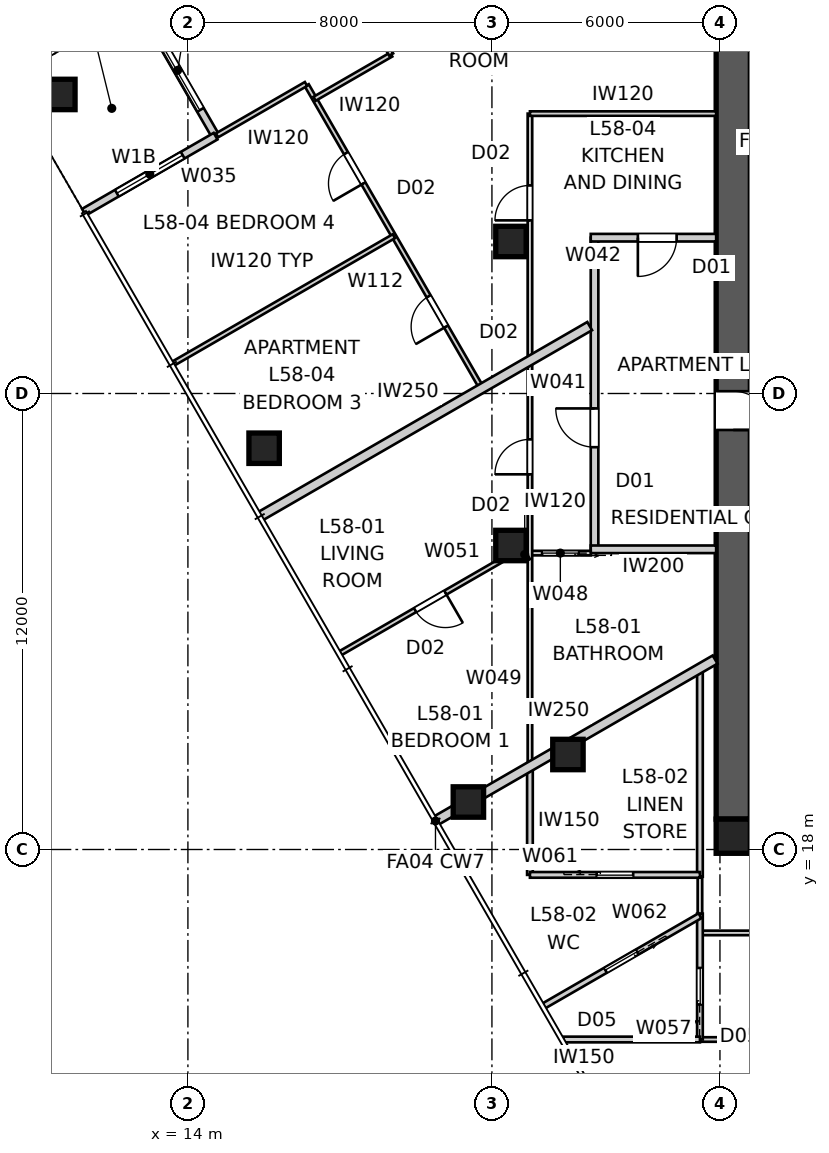
"""IFC4 building model, lengths in metres.
Left out: names, types, materials, properties, quantities, classifications, styles, units other than length and angle.
Written with IfcOpenShell. Run it as: python <this file> out.ifc"""

import sys

from ifc_helpers import new_model, si_unit, direction, frame, frame_2d, origin, origin_2d, place, context, subcontext, project, spatial, polyline, rectangle, outline, extrude, element, fill, save


model = new_model("IFC4")
c1 = context("Model", 3, precision=1e-05, world=origin(), true_north=direction((0.0, 1.0)))
c2 = subcontext(c1, "Body", "Model", "MODEL_VIEW")
j1 = project(units=[si_unit("LENGTHUNIT", "METRE"), si_unit("PLANEANGLEUNIT", "RADIAN")], contexts=[c1])
p1 = place(None, origin())
s1 = spatial("IfcSite", under=j1, at=p1, CompositionType="ELEMENT")
p2 = place(p1, origin())
s2 = spatial("IfcBuilding", under=s1, at=p2, CompositionType="ELEMENT")
p3 = place(p2, frame((0.0, 0.0, 211.6)))
s3 = spatial("IfcBuildingStorey", under=s2, at=p3, CompositionType="ELEMENT", Elevation=211.6)
p4 = place(p3, frame((51.2, 18.35, 0.0), z_axis=(0.0, 0.0, 1.0), x_axis=(-1.0, 0.0, 0.0)))
e1 = element("IfcWall", 1, at=p4, inside=s3, PredefinedType="SHEAR", context=c2, shape_type="SweptSolid", body=[
    extrude(outline(polyline([(0.0, -0.45), (22.4, -0.45), (22.4, -0.025), (22.85, -0.025), (22.85, 0.025), (22.4, 0.025), (22.4, 0.45), (0.0, 0.45), (0.0, 0.025), (-0.45, 0.025), (-0.45, -0.025), (0.0, -0.025), (0.0, -0.45)])), origin(), (0.0, 0.0, 1.0), 3.4),
])
p5 = place(p3, frame((28.35, 41.2, 0.0), z_axis=(0.0, 0.0, 1.0), x_axis=(0.0, -1.0, 0.0)))
e2 = element("IfcWall", 2, at=p5, inside=s3, PredefinedType="SHEAR", context=c2, shape_type="SweptSolid", body=[
    extrude(outline(polyline([(0.0, -0.45), (22.4, -0.45), (22.4, -0.025), (22.85, -0.025), (22.85, 0.025), (22.4, 0.025), (22.4, 0.45), (0.0, 0.45), (0.0, 0.025), (-0.45, 0.025), (-0.45, -0.025), (0.0, -0.025), (0.0, -0.45)])), origin(), (0.0, 0.0, 1.0), 3.4),
])
p6 = place(p5, frame((11.14, 0.0, 0.0)))
e3 = element("IfcOpeningElement", 3, at=p6, cuts=e2, PredefinedType="OPENING", context=c2, shape_type="SweptSolid", body=[
    extrude(rectangle(XDim=1.02, YDim=2.4, at=frame_2d((0.51, 1.2))), frame((0.0, 0.46, 0.0), z_axis=(0.0, -1.0, 0.0), x_axis=(1.0, 0.0, 0.0)), (0.0, 0.0, 1.0), 0.92),
])
p7 = place(p3, frame((28.35, 18.35, 0.0), z_axis=(0.0, 0.0, 1.0), x_axis=(1.0, 0.0, 0.0)))
e4 = element("IfcColumn", 4, at=p7, inside=s3, PredefinedType="COLUMN", context=c2, shape_type="SweptSolid", body=[
    extrude(rectangle(XDim=0.9, YDim=0.9, at=origin_2d()), origin(), (0.0, 0.0, 1.0), 3.4),
])
for number, where, z_axis, x_axis in (
    (5, (10.63, 37.87, 0.0), (0.0, 0.0, 1.0), (1.0, 0.0, 0.0)),
    (6, (16.005, 28.56, 0.0), (0.0, 0.0, 1.0), (1.0, 0.0, 0.0)),
    (7, (21.38, 19.25, 0.0), (0.0, 0.0, 1.0), (1.0, 0.0, 0.0)),
    (8, (22.5, 34.0, 0.0), (0.0, 0.0, 1.0), (1.0, 0.0, 0.0)),
    (9, (22.5, 26.0, 0.0), (0.0, 0.0, 1.0), (1.0, 0.0, 0.0)),
    (10, (24.0, 20.5, 0.0), (0.0, 0.0, 1.0), (1.0, 0.0, 0.0)),
):
    element("IfcColumn", number, at=place(p3, frame(where, z_axis=z_axis, x_axis=x_axis)), inside=s3, PredefinedType="COLUMN", context=c2, shape_type="SweptSolid", body=[
        extrude(rectangle(XDim=0.8, YDim=0.8, at=origin_2d()), origin(), (0.0, 0.0, 1.0), 3.4),
    ])
p8 = place(p3, frame((12.729, 40.236, 0.0), z_axis=(0.0, 0.0, 1.0), x_axis=(0.49999894854, -0.866026010844, 0.0)))
e11 = element("IfcWall", 11, at=p8, inside=s3, PredefinedType="SOLIDWALL", context=c2, shape_type="SweptSolid", body=[
    extrude(rectangle(XDim=4.0, YDim=0.2, at=frame_2d((2.0, 0.0))), origin(), (0.0, 0.0, 1.0), 3.25),
])
p9 = place(p8, frame((0.8, 0.0, 0.0)))
e12 = element("IfcOpeningElement", 12, at=p9, cuts=e11, PredefinedType="OPENING", context=c2, shape_type="SweptSolid", body=[
    extrude(rectangle(XDim=2.4, YDim=2.1, at=frame_2d((1.2, 1.05))), frame((0.0, 0.11, 0.0), z_axis=(0.0, -1.0, 0.0), x_axis=(1.0, 0.0, 0.0)), (0.0, 0.0, 1.0), 0.22),
])
p10 = place(p3, frame((14.729, 36.771, 0.0), z_axis=(0.0, 0.0, 1.0), x_axis=(-0.866026010844, -0.49999894854, 0.0)))
e13 = element("IfcWall", 13, at=p10, inside=s3, PredefinedType="SOLIDWALL", context=c2, shape_type="SweptSolid", body=[
    extrude(rectangle(XDim=4.0, YDim=0.2, at=frame_2d((2.0, 0.0))), origin(), (0.0, 0.0, 1.0), 3.25),
])
p11 = place(p10, frame((1.0, 0.0, 0.45)))
e14 = element("IfcOpeningElement", 14, at=p11, cuts=e13, PredefinedType="OPENING", context=c2, shape_type="SweptSolid", body=[
    extrude(rectangle(XDim=2.0, YDim=1.8, at=frame_2d((1.0, 0.9))), frame((0.0, 0.11, 0.0), z_axis=(0.0, -1.0, 0.0), x_axis=(1.0, 0.0, 0.0)), (0.0, 0.0, 1.0), 0.22),
])
p12 = place(p3, frame((24.7, 25.9, 0.0), z_axis=(0.0, 0.0, 1.0), x_axis=(0.0, 1.0, 0.0)))
e15 = element("IfcWall", 15, at=p12, inside=s3, PredefinedType="PARTITIONING", context=c2, shape_type="SweptSolid", body=[
    extrude(rectangle(XDim=8.2, YDim=0.2, at=frame_2d((4.1, 0.0))), origin(), (0.0, 0.0, 1.0), 3.25),
])
p13 = place(p12, frame((2.687, 0.0, 0.0)))
e16 = element("IfcOpeningElement", 16, at=p13, cuts=e15, PredefinedType="OPENING", context=c2, shape_type="SweptSolid", body=[
    extrude(rectangle(XDim=1.02, YDim=2.34, at=frame_2d((0.51, 1.17))), frame((0.0, 0.11, 0.0), z_axis=(0.0, -1.0, 0.0), x_axis=(1.0, 0.0, 0.0)), (0.0, 0.0, 1.0), 0.22),
])
p14 = place(p3, frame((27.9, 34.1, 0.0), z_axis=(0.0, 0.0, 1.0), x_axis=(-1.0, 0.0, 0.0)))
e17 = element("IfcWall", 17, at=p14, inside=s3, PredefinedType="PARTITIONING", context=c2, shape_type="SweptSolid", body=[
    extrude(rectangle(XDim=3.3, YDim=0.2, at=frame_2d((1.65, 0.0))), origin(), (0.0, 0.0, 1.0), 3.25),
])
p15 = place(p14, frame((1.04, 0.0, 0.0)))
e18 = element("IfcOpeningElement", 18, at=p15, cuts=e17, PredefinedType="OPENING", context=c2, shape_type="SweptSolid", body=[
    extrude(rectangle(XDim=1.02, YDim=2.34, at=frame_2d((0.51, 1.17))), frame((0.0, 0.11, 0.0), z_axis=(0.0, -1.0, 0.0), x_axis=(1.0, 0.0, 0.0)), (0.0, 0.0, 1.0), 0.22),
])
p16 = place(p3, frame((27.9, 25.9, 0.0), z_axis=(0.0, 0.0, 1.0), x_axis=(-1.0, 0.0, 0.0)))
e19 = element("IfcWall", 19, at=p16, inside=s3, PredefinedType="PARTITIONING", context=c2, shape_type="SweptSolid", body=[
    extrude(rectangle(XDim=3.3, YDim=0.2, at=frame_2d((1.65, 0.0))), origin(), (0.0, 0.0, 1.0), 3.25),
])
p17 = place(p3, frame((20.514, 18.75, 0.0), z_axis=(0.0, 0.0, 1.0), x_axis=(0.866020489494, 0.500008511703, 0.0)))
e20 = element("IfcWall", 20, at=p17, inside=s3, PredefinedType="PARTITIONING", context=c2, shape_type="SweptSolid", body=[
    extrude(rectangle(XDim=8.496, YDim=0.25, at=frame_2d((4.248, 0.0))), origin(), (0.0, 0.0, 1.0), 3.25),
])
p18 = place(p3, frame((15.889, 26.761, 0.0), z_axis=(0.0, 0.0, 1.0), x_axis=(0.866024190901, 0.50000210077, 0.0)))
e21 = element("IfcWall", 21, at=p18, inside=s3, PredefinedType="PARTITIONING", context=c2, shape_type="SweptSolid", body=[
    extrude(rectangle(XDim=10.026, YDim=0.25, at=frame_2d((5.013, 0.0))), origin(), (0.0, 0.0, 1.0), 3.25),
])
p19 = place(p3, frame((24.6, 25.8, 0.0), z_axis=(0.0, 0.0, 1.0), x_axis=(-1.0, 0.0, 0.0)))
e22 = element("IfcWall", 22, at=p19, inside=s3, PredefinedType="PARTITIONING", context=c2, shape_type="SweptSolid", body=[
    extrude(rectangle(XDim=1.6, YDim=0.12, at=frame_2d((0.8, 0.0))), origin(), (0.0, 0.0, 1.0), 3.25),
])
p20 = place(p19, frame((0.32, 0.0, 0.0)))
e23 = element("IfcOpeningElement", 23, at=p20, cuts=e22, PredefinedType="OPENING", context=c2, shape_type="SweptSolid", body=[
    extrude(rectangle(XDim=0.96, YDim=2.1, at=frame_2d((0.48, 1.05))), frame((0.0, 0.07, 0.0), z_axis=(0.0, -1.0, 0.0), x_axis=(1.0, 0.0, 0.0)), (0.0, 0.0, 1.0), 0.14),
])
p21 = place(p3, frame((23.0, 20.185, 0.0), z_axis=(0.0, 0.0, 1.0), x_axis=(0.0, 1.0, 0.0)))
e24 = element("IfcWall", 24, at=p21, inside=s3, PredefinedType="PARTITIONING", context=c2, shape_type="SweptSolid", body=[
    extrude(rectangle(XDim=17.18, YDim=0.12, at=frame_2d((8.59, 0.0))), origin(), (0.0, 0.0, 1.0), 2.55),
])
p22 = place(p21, frame((7.688, 0.0, 0.0)))
e25 = element("IfcOpeningElement", 25, at=p22, cuts=e24, PredefinedType="OPENING", context=c2, shape_type="SweptSolid", body=[
    extrude(rectangle(XDim=0.92, YDim=2.34, at=frame_2d((0.46, 1.17))), frame((0.0, 0.07, 0.0), z_axis=(0.0, -1.0, 0.0), x_axis=(1.0, 0.0, 0.0)), (0.0, 0.0, 1.0), 0.14),
])
p23 = place(p21, frame((14.371, 0.0, 0.0)))
e26 = element("IfcOpeningElement", 26, at=p23, cuts=e24, PredefinedType="OPENING", context=c2, shape_type="SweptSolid", body=[
    extrude(rectangle(XDim=0.92, YDim=2.34, at=frame_2d((0.46, 1.17))), frame((0.0, 0.07, 0.0), z_axis=(0.0, -1.0, 0.0), x_axis=(1.0, 0.0, 0.0)), (0.0, 0.0, 1.0), 0.14),
])
p24 = place(p3, frame((22.95, 25.612, 0.0), z_axis=(0.0, 0.0, 1.0), x_axis=(-0.49996389635, 0.866046247233, 0.0)))
e27 = element("IfcWall", 27, at=p24, inside=s3, PredefinedType="PARTITIONING", context=c2, shape_type="SweptSolid", body=[
    extrude(rectangle(XDim=0.35, YDim=0.12, at=frame_2d((0.175, 0.0))), origin(), (0.0, 0.0, 1.0), 3.25),
])
p25 = place(p3, frame((22.775, 25.915, 0.0), z_axis=(0.0, 0.0, 1.0), x_axis=(-0.866019274569, -0.500010615962, 0.0)))
e28 = element("IfcWall", 28, at=p25, inside=s3, PredefinedType="PARTITIONING", context=c2, shape_type="SweptSolid", body=[
    extrude(rectangle(XDim=5.5, YDim=0.12, at=frame_2d((2.75, 0.0))), origin(), (0.0, 0.0, 1.0), 3.25),
])
p26 = place(p25, frame((2.31, 0.0, 0.0)))
e29 = element("IfcOpeningElement", 29, at=p26, cuts=e28, PredefinedType="OPENING", context=c2, shape_type="SweptSolid", body=[
    extrude(rectangle(XDim=0.92, YDim=2.34, at=frame_2d((0.46, 1.17))), frame((0.0, 0.07, 0.0), z_axis=(0.0, -1.0, 0.0), x_axis=(1.0, 0.0, 0.0)), (0.0, 0.0, 1.0), 0.14),
])
p27 = place(p3, frame((27.473, 15.805, 0.0), z_axis=(0.0, 0.0, 1.0), x_axis=(1.0, 0.0, 0.0)))
e30 = element("IfcWall", 30, at=p27, inside=s3, PredefinedType="PARTITIONING", context=c2, shape_type="SweptSolid", body=[
    extrude(rectangle(XDim=5.625, YDim=0.12, at=frame_2d((2.812, 0.0))), origin(), (0.0, 0.0, 1.0), 3.25),
])
p28 = place(p3, frame((33.793, 13.0, 0.0), z_axis=(0.0, 0.0, 1.0), x_axis=(-1.0, 0.0, 0.0)))
e31 = element("IfcWall", 31, at=p28, inside=s3, PredefinedType="PARTITIONING", context=c2, shape_type="SweptSolid", body=[
    extrude(rectangle(XDim=6.32, YDim=0.12, at=frame_2d((3.16, 0.0))), origin(), (0.0, 0.0, 1.0), 3.25),
])
p29 = place(p3, frame((27.473, 13.0, 0.0), z_axis=(0.0, 0.0, 1.0), x_axis=(0.0, 1.0, 0.0)))
e32 = element("IfcWall", 32, at=p29, inside=s3, PredefinedType="SOLIDWALL", context=c2, shape_type="SweptSolid", body=[
    extrude(rectangle(XDim=3.314, YDim=0.15, at=frame_2d((1.657, 0.0))), origin(), (0.0, 0.0, 1.0), 3.25),
])
p30 = place(p29, frame((0.922, 0.0, 0.0)))
e33 = element("IfcOpeningElement", 33, at=p30, cuts=e32, PredefinedType="OPENING", context=c2, shape_type="SweptSolid", body=[
    extrude(rectangle(XDim=0.96, YDim=2.1, at=frame_2d((0.48, 1.05))), frame((0.0, 0.085, 0.0), z_axis=(0.0, -1.0, 0.0), x_axis=(1.0, 0.0, 0.0)), (0.0, 0.0, 1.0), 0.17),
])
p31 = place(p3, frame((27.473, 16.314, 0.0), z_axis=(0.0, 0.0, 1.0), x_axis=(0.0, 1.0, 0.0)))
e34 = element("IfcWall", 34, at=p31, inside=s3, PredefinedType="PARTITIONING", context=c2, shape_type="SweptSolid", body=[
    extrude(rectangle(XDim=0.969, YDim=0.12, at=frame_2d((0.484, 0.0))), origin(), (0.0, 0.0, 1.0), 3.25),
])
p32 = place(p3, frame((27.473, 17.282, 0.0), z_axis=(0.0, 0.0, 1.0), x_axis=(0.0, 1.0, 0.0)))
e35 = element("IfcWall", 35, at=p32, inside=s3, PredefinedType="SOLIDWALL", context=c2, shape_type="SweptSolid", body=[
    extrude(rectangle(XDim=5.485, YDim=0.15, at=frame_2d((2.743, 0.0))), origin(), (0.0, 0.0, 1.0), 3.25),
])
p33 = place(p3, frame((23.0, 20.185, 0.0), z_axis=(0.0, 0.0, 1.0), x_axis=(0.0, -1.0, 0.0)))
e36 = element("IfcWall", 36, at=p33, inside=s3, PredefinedType="SOLIDWALL", context=c2, shape_type="SweptSolid", body=[
    extrude(rectangle(XDim=2.853, YDim=0.15, at=frame_2d((1.426, 0.0))), origin(), (0.0, 0.0, 1.0), 3.25),
])
p34 = place(p3, frame((23.0, 17.332, 0.0), z_axis=(0.0, 0.0, 1.0), x_axis=(1.0, 0.0, 0.0)))
e37 = element("IfcWall", 37, at=p34, inside=s3, PredefinedType="SOLIDWALL", context=c2, shape_type="SweptSolid", body=[
    extrude(rectangle(XDim=4.473, YDim=0.15, at=frame_2d((2.237, 0.0))), origin(), (0.0, 0.0, 1.0), 3.25),
])
p35 = place(p34, frame((1.757, 0.0, 0.0)))
e38 = element("IfcOpeningElement", 38, at=p35, cuts=e37, PredefinedType="OPENING", context=c2, shape_type="SweptSolid", body=[
    extrude(rectangle(XDim=0.96, YDim=2.1, at=frame_2d((0.48, 1.05))), frame((0.0, 0.085, 0.0), z_axis=(0.0, -1.0, 0.0), x_axis=(1.0, 0.0, 0.0)), (0.0, 0.0, 1.0), 0.17),
])
p36 = place(p3, frame((27.473, 16.256, 0.0), z_axis=(0.0, 0.0, 1.0), x_axis=(-0.866047486323, -0.49996174997, 0.0)))
e39 = element("IfcWall", 39, at=p36, inside=s3, PredefinedType="SOLIDWALL", context=c2, shape_type="SweptSolid", body=[
    extrude(rectangle(XDim=4.74, YDim=0.15, at=frame_2d((2.37, 0.0))), origin(), (0.0, 0.0, 1.0), 3.25),
])
p37 = place(p36, frame((1.91, 0.0, 0.0)))
e40 = element("IfcOpeningElement", 40, at=p37, cuts=e39, PredefinedType="OPENING", context=c2, shape_type="SweptSolid", body=[
    extrude(rectangle(XDim=0.96, YDim=2.1, at=frame_2d((0.48, 1.05))), frame((0.0, 0.085, 0.0), z_axis=(0.0, -1.0, 0.0), x_axis=(1.0, 0.0, 0.0)), (0.0, 0.0, 1.0), 0.17),
])
p38 = place(p3, frame((23.88, 13.0, 0.0), z_axis=(0.0, 0.0, 1.0), x_axis=(1.0, 0.0, 0.0)))
e41 = element("IfcWall", 41, at=p38, inside=s3, PredefinedType="SOLIDWALL", context=c2, shape_type="SweptSolid", body=[
    extrude(rectangle(XDim=3.593, YDim=0.15, at=frame_2d((1.796, 0.0))), origin(), (0.0, 0.0, 1.0), 3.25),
])
p39 = place(p3, frame((23.0, 37.365, 0.0), z_axis=(0.0, 0.0, 1.0), x_axis=(1.0, 0.0, 0.0)))
e42 = element("IfcWall", 42, at=p39, inside=s3, PredefinedType="PARTITIONING", context=c2, shape_type="SweptSolid", body=[
    extrude(rectangle(XDim=4.9, YDim=0.12, at=frame_2d((2.45, 0.0))), origin(), (0.0, 0.0, 1.0), 3.25),
])
p40 = place(p3, frame((21.733, 30.134, 0.0), z_axis=(0.0, 0.0, 1.0), x_axis=(-0.500019218905, 0.86601430746, 0.0)))
e43 = element("IfcWall", 43, at=p40, inside=s3, PredefinedType="PARTITIONING", context=c2, shape_type="SweptSolid", body=[
    extrude(rectangle(XDim=9.21, YDim=0.12, at=frame_2d((4.605, 0.0))), origin(), (0.0, 0.0, 1.0), 3.25),
])
p41 = place(p40, frame((1.877, 0.0, 0.0)))
e44 = element("IfcOpeningElement", 44, at=p41, cuts=e43, PredefinedType="OPENING", context=c2, shape_type="SweptSolid", body=[
    extrude(rectangle(XDim=0.92, YDim=2.34, at=frame_2d((0.46, 1.17))), frame((0.0, 0.07, 0.0), z_axis=(0.0, -1.0, 0.0), x_axis=(1.0, 0.0, 0.0)), (0.0, 0.0, 1.0), 0.14),
])
p42 = place(p40, frame((6.228, 0.0, 0.0)))
e45 = element("IfcOpeningElement", 45, at=p42, cuts=e43, PredefinedType="OPENING", context=c2, shape_type="SweptSolid", body=[
    extrude(rectangle(XDim=0.92, YDim=2.34, at=frame_2d((0.46, 1.17))), frame((0.0, 0.07, 0.0), z_axis=(0.0, -1.0, 0.0), x_axis=(1.0, 0.0, 0.0)), (0.0, 0.0, 1.0), 0.14),
])
p43 = place(p3, frame((17.333, 37.755, 0.0), z_axis=(0.0, 0.0, 1.0), x_axis=(0.866059848015, 0.499940336097, 0.0)))
e46 = element("IfcWall", 46, at=p43, inside=s3, PredefinedType="PARTITIONING", context=c2, shape_type="SweptSolid", body=[
    extrude(rectangle(XDim=2.328, YDim=0.12, at=frame_2d((1.164, 0.0))), origin(), (0.0, 0.0, 1.0), 3.25),
])
p44 = place(p3, frame((19.349, 38.919, 0.0), z_axis=(0.0, 0.0, 1.0), x_axis=(-0.499997192861, 0.866027024481, 0.0)))
e47 = element("IfcWall", 47, at=p44, inside=s3, PredefinedType="PARTITIONING", context=c2, shape_type="SweptSolid", body=[
    extrude(rectangle(XDim=4.41, YDim=0.12, at=frame_2d((2.205, 0.0))), origin(), (0.0, 0.0, 1.0), 3.25),
])
p45 = place(p44, frame((1.765, 0.0, 0.0)))
e48 = element("IfcOpeningElement", 48, at=p45, cuts=e47, PredefinedType="OPENING", context=c2, shape_type="SweptSolid", body=[
    extrude(rectangle(XDim=0.92, YDim=2.34, at=frame_2d((0.46, 1.17))), frame((0.0, 0.07, 0.0), z_axis=(0.0, -1.0, 0.0), x_axis=(1.0, 0.0, 0.0)), (0.0, 0.0, 1.0), 0.14),
])
p46 = place(p3, frame((13.612, 30.786, 0.0), z_axis=(0.0, 0.0, 1.0), x_axis=(0.866030409726, 0.499991329354, 0.0)))
e49 = element("IfcWall", 49, at=p46, inside=s3, PredefinedType="PARTITIONING", context=c2, shape_type="SweptSolid", body=[
    extrude(rectangle(XDim=6.707, YDim=0.12, at=frame_2d((3.354, 0.0))), origin(), (0.0, 0.0, 1.0), 3.25),
])
p47 = place(p3, frame((14.763, 36.792, 0.0), z_axis=(0.0, 0.0, 1.0), x_axis=(0.86601436245, 0.500019123664, 0.0)))
e50 = element("IfcWall", 50, at=p47, inside=s3, PredefinedType="PARTITIONING", context=c2, shape_type="SweptSolid", body=[
    extrude(rectangle(XDim=2.707, YDim=0.12, at=frame_2d((1.354, 0.0))), origin(), (0.0, 0.0, 1.0), 3.25),
])
p48 = place(p9, origin())
e51 = element("IfcDoor", 51, at=p48, inside=s3, OperationType="SLIDING_TO_LEFT", PredefinedType="DOOR", context=c2, shape_type="SweptSolid", body=[
    extrude(rectangle(XDim=2.4, YDim=2.1, at=frame_2d((1.2, 1.05))), frame((0.0, 0.025, 0.0), z_axis=(0.0, -1.0, 0.0), x_axis=(1.0, 0.0, 0.0)), (0.0, 0.0, 1.0), 0.05),
])
fill(e12, e51)
p49 = place(p11, origin())
e52 = element("IfcWindow", 52, at=p49, inside=s3, PartitioningType="SINGLE_PANEL", PredefinedType="WINDOW", context=c2, shape_type="SweptSolid", body=[
    extrude(rectangle(XDim=2.0, YDim=1.8, at=frame_2d((1.0, 0.9))), frame((0.0, 0.03, 0.0), z_axis=(0.0, -1.0, 0.0), x_axis=(1.0, 0.0, 0.0)), (0.0, 0.0, 1.0), 0.06),
])
fill(e14, e52)
p50 = place(p13, origin())
e53 = element("IfcDoor", 53, at=p50, inside=s3, OperationType="SINGLE_SWING_RIGHT", PredefinedType="DOOR", context=c2, shape_type="SweptSolid", body=[
    extrude(rectangle(XDim=1.02, YDim=2.34, at=frame_2d((0.51, 1.17))), frame((0.0, 0.025, 0.0), z_axis=(0.0, -1.0, 0.0), x_axis=(1.0, 0.0, 0.0)), (0.0, 0.0, 1.0), 0.05),
])
fill(e16, e53)
p51 = place(p15, origin())
e54 = element("IfcDoor", 54, at=p51, inside=s3, OperationType="SINGLE_SWING_RIGHT", PredefinedType="DOOR", context=c2, shape_type="SweptSolid", body=[
    extrude(rectangle(XDim=1.02, YDim=2.34, at=frame_2d((0.51, 1.17))), frame((0.0, 0.025, 0.0), z_axis=(0.0, -1.0, 0.0), x_axis=(1.0, 0.0, 0.0)), (0.0, 0.0, 1.0), 0.05),
])
fill(e18, e54)
p52 = place(p22, origin())
e55 = element("IfcDoor", 55, at=p52, inside=s3, OperationType="SINGLE_SWING_LEFT", PredefinedType="DOOR", context=c2, shape_type="SweptSolid", body=[
    extrude(rectangle(XDim=0.92, YDim=2.34, at=frame_2d((0.46, 1.17))), frame((0.0, 0.025, 0.0), z_axis=(0.0, -1.0, 0.0), x_axis=(1.0, 0.0, 0.0)), (0.0, 0.0, 1.0), 0.05),
])
fill(e25, e55)
p53 = place(p20, origin())
e56 = element("IfcDoor", 56, at=p53, inside=s3, OperationType="SLIDING_TO_LEFT", PredefinedType="DOOR", context=c2, shape_type="SweptSolid", body=[
    extrude(rectangle(XDim=0.96, YDim=2.1, at=frame_2d((0.48, 1.05))), frame((0.0, 0.025, 0.0), z_axis=(0.0, -1.0, 0.0), x_axis=(1.0, 0.0, 0.0)), (0.0, 0.0, 1.0), 0.05),
])
fill(e23, e56)
p54 = place(p23, origin())
e57 = element("IfcDoor", 57, at=p54, inside=s3, OperationType="SINGLE_SWING_LEFT", PredefinedType="DOOR", context=c2, shape_type="SweptSolid", body=[
    extrude(rectangle(XDim=0.92, YDim=2.34, at=frame_2d((0.46, 1.17))), frame((0.0, 0.025, 0.0), z_axis=(0.0, -1.0, 0.0), x_axis=(1.0, 0.0, 0.0)), (0.0, 0.0, 1.0), 0.05),
])
fill(e26, e57)
p55 = place(p26, origin())
e58 = element("IfcDoor", 58, at=p55, inside=s3, OperationType="SINGLE_SWING_LEFT", PredefinedType="DOOR", context=c2, shape_type="SweptSolid", body=[
    extrude(rectangle(XDim=0.92, YDim=2.34, at=frame_2d((0.46, 1.17))), frame((0.0, 0.025, 0.0), z_axis=(0.0, -1.0, 0.0), x_axis=(1.0, 0.0, 0.0)), (0.0, 0.0, 1.0), 0.05),
])
fill(e29, e58)
p56 = place(p41, origin())
e59 = element("IfcDoor", 59, at=p56, inside=s3, OperationType="SINGLE_SWING_LEFT", PredefinedType="DOOR", context=c2, shape_type="SweptSolid", body=[
    extrude(rectangle(XDim=0.92, YDim=2.34, at=frame_2d((0.46, 1.17))), frame((0.0, 0.025, 0.0), z_axis=(0.0, -1.0, 0.0), x_axis=(1.0, 0.0, 0.0)), (0.0, 0.0, 1.0), 0.05),
])
fill(e44, e59)
p57 = place(p42, origin())
e60 = element("IfcDoor", 60, at=p57, inside=s3, OperationType="SINGLE_SWING_LEFT", PredefinedType="DOOR", context=c2, shape_type="SweptSolid", body=[
    extrude(rectangle(XDim=0.92, YDim=2.34, at=frame_2d((0.46, 1.17))), frame((0.0, 0.025, 0.0), z_axis=(0.0, -1.0, 0.0), x_axis=(1.0, 0.0, 0.0)), (0.0, 0.0, 1.0), 0.05),
])
fill(e45, e60)
p58 = place(p30, origin())
e61 = element("IfcDoor", 61, at=p58, inside=s3, OperationType="SLIDING_TO_LEFT", PredefinedType="DOOR", context=c2, shape_type="SweptSolid", body=[
    extrude(rectangle(XDim=0.96, YDim=2.1, at=frame_2d((0.48, 1.05))), frame((0.0, 0.025, 0.0), z_axis=(0.0, -1.0, 0.0), x_axis=(1.0, 0.0, 0.0)), (0.0, 0.0, 1.0), 0.05),
])
fill(e33, e61)
p59 = place(p37, origin())
e62 = element("IfcDoor", 62, at=p59, inside=s3, OperationType="SLIDING_TO_LEFT", PredefinedType="DOOR", context=c2, shape_type="SweptSolid", body=[
    extrude(rectangle(XDim=0.96, YDim=2.1, at=frame_2d((0.48, 1.05))), frame((0.0, 0.025, 0.0), z_axis=(0.0, -1.0, 0.0), x_axis=(1.0, 0.0, 0.0)), (0.0, 0.0, 1.0), 0.05),
])
fill(e40, e62)
p60 = place(p35, origin())
e63 = element("IfcDoor", 63, at=p60, inside=s3, OperationType="SLIDING_TO_LEFT", PredefinedType="DOOR", context=c2, shape_type="SweptSolid", body=[
    extrude(rectangle(XDim=0.96, YDim=2.1, at=frame_2d((0.48, 1.05))), frame((0.0, 0.025, 0.0), z_axis=(0.0, -1.0, 0.0), x_axis=(1.0, 0.0, 0.0)), (0.0, 0.0, 1.0), 0.05),
])
fill(e38, e63)
p61 = place(p6, origin())
e64 = element("IfcDoor", 64, at=p61, inside=s3, OperationType="SINGLE_SWING_RIGHT", PredefinedType="DOOR", context=c2, shape_type="SweptSolid", body=[
    extrude(rectangle(XDim=1.02, YDim=2.4, at=frame_2d((0.51, 1.2))), frame((0.0, 0.025, 0.0), z_axis=(0.0, -1.0, 0.0), x_axis=(1.0, 0.0, 0.0)), (0.0, 0.0, 1.0), 0.05),
])
fill(e3, e64)
save(model, sys.argv[1])
